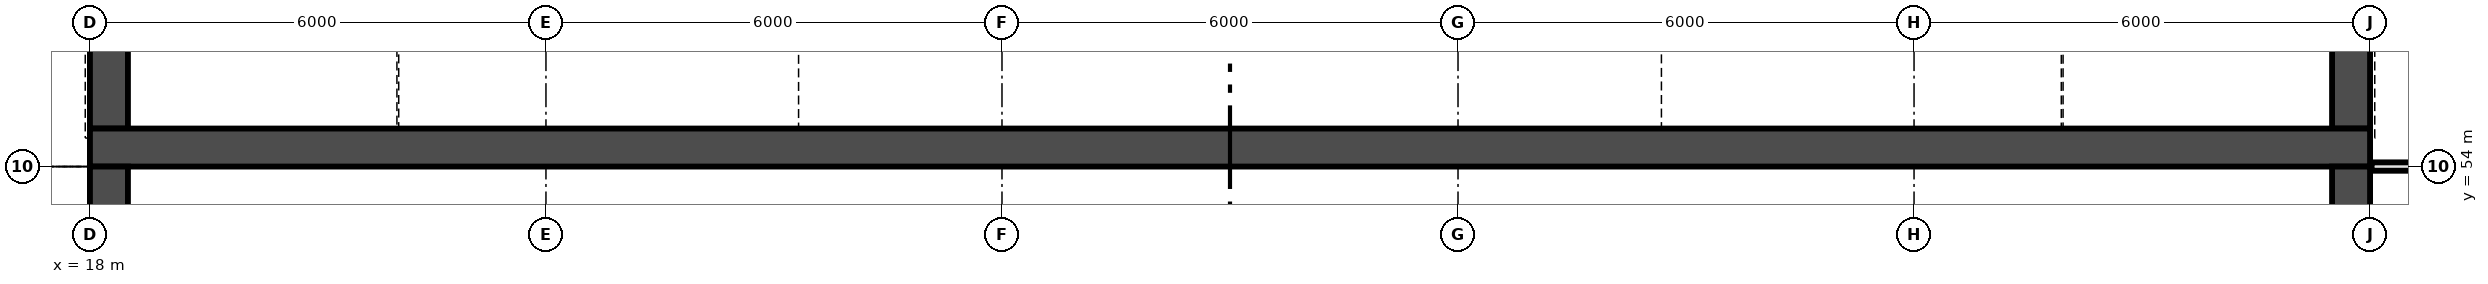
"""IFC4 building model, lengths in metres.
Left out: names, types, materials, properties, quantities, classifications, styles, units other than length and angle.
Written with IfcOpenShell. Run it as: python <this file> out.ifc"""

import sys

from ifc_helpers import new_model, si_unit, direction, frame, frame_2d, origin, place, context, subcontext, project, spatial, rectangle, extrude, element, save


model = new_model("IFC4")
c1 = context("Model", 3, precision=1e-05, world=origin(), true_north=direction((0.0, 1.0)))
c2 = subcontext(c1, "Body", "Model", "MODEL_VIEW")
j1 = project(units=[si_unit("LENGTHUNIT", "METRE"), si_unit("PLANEANGLEUNIT", "RADIAN")], contexts=[c1])
p1 = place(None, origin())
s1 = spatial("IfcSite", under=j1, at=p1, CompositionType="ELEMENT")
p2 = place(p1, origin())
s2 = spatial("IfcBuilding", under=s1, at=p2, CompositionType="ELEMENT")
p3 = place(p2, frame((0.0, 0.0, 16.5)))
s3 = spatial("IfcBuildingStorey", under=s2, at=p3, CompositionType="ELEMENT", Elevation=16.5)
p4 = place(p3, frame((18.25, 54.5, 0.0), z_axis=(0.0, 0.0, 1.0), x_axis=(0.0, 1.0, 0.0)))
e1 = element("IfcWall", 1, at=p4, inside=s3, PredefinedType="SHEAR", context=c2, shape_type="SweptSolid", body=[
    extrude(rectangle(XDim=35.5, YDim=0.5, at=frame_2d((17.75, 0.0))), origin(), (0.0, 0.0, 1.0), 3.9),
])
p5 = place(p4, frame((29.35, 0.0, 0.0)))
e2 = element("IfcOpeningElement", 2, at=p5, cuts=e1, PredefinedType="OPENING", context=c2, shape_type="SweptSolid", body=[
    extrude(rectangle(XDim=1.3, YDim=2.1, at=frame_2d((0.65, 1.05))), frame((0.0, 0.26, 0.0), z_axis=(0.0, -1.0, 0.0), x_axis=(1.0, 0.0, 0.0)), (0.0, 0.0, 1.0), 0.52),
])
p6 = place(p4, frame((2.6, 0.0, 0.0)))
e3 = element("IfcOpeningElement", 3, at=p6, cuts=e1, PredefinedType="OPENING", context=c2, shape_type="SweptSolid", body=[
    extrude(rectangle(XDim=1.0, YDim=2.1, at=frame_2d((0.5, 1.05))), frame((0.0, 0.26, 0.0), z_axis=(0.0, -1.0, 0.0), x_axis=(1.0, 0.0, 0.0)), (0.0, 0.0, 1.0), 0.52),
])
p7 = place(p3, frame((18.25, 30.0, 0.0), z_axis=(0.0, 0.0, 1.0), x_axis=(0.0, 1.0, 0.0)))
e4 = element("IfcWall", 4, at=p7, inside=s3, PredefinedType="SHEAR", context=c2, shape_type="SweptSolid", body=[
    extrude(rectangle(XDim=24.0, YDim=0.5, at=frame_2d((12.0, 0.0))), origin(), (0.0, 0.0, 1.0), 6.5),
])
p8 = place(p3, frame((47.75, 54.5, 0.0), z_axis=(0.0, 0.0, 1.0), x_axis=(0.0, 1.0, 0.0)))
e5 = element("IfcWall", 5, at=p8, inside=s3, PredefinedType="SHEAR", context=c2, shape_type="SweptSolid", body=[
    extrude(rectangle(XDim=35.5, YDim=0.5, at=frame_2d((17.75, 0.0))), origin(), (0.0, 0.0, 1.0), 3.9),
])
p9 = place(p8, frame((29.35, 0.0, 0.0)))
e6 = element("IfcOpeningElement", 6, at=p9, cuts=e5, PredefinedType="OPENING", context=c2, shape_type="SweptSolid", body=[
    extrude(rectangle(XDim=1.3, YDim=2.1, at=frame_2d((0.65, 1.05))), frame((0.0, 0.26, 0.0), z_axis=(0.0, -1.0, 0.0), x_axis=(1.0, 0.0, 0.0)), (0.0, 0.0, 1.0), 0.52),
])
p10 = place(p8, frame((2.6, 0.0, 0.0)))
e7 = element("IfcOpeningElement", 7, at=p10, cuts=e5, PredefinedType="OPENING", context=c2, shape_type="SweptSolid", body=[
    extrude(rectangle(XDim=1.0, YDim=2.1, at=frame_2d((0.5, 1.05))), frame((0.0, 0.26, 0.0), z_axis=(0.0, -1.0, 0.0), x_axis=(1.0, 0.0, 0.0)), (0.0, 0.0, 1.0), 0.52),
])
p11 = place(p3, frame((47.75, 30.0, 0.0), z_axis=(0.0, 0.0, 1.0), x_axis=(0.0, 1.0, 0.0)))
e8 = element("IfcWall", 8, at=p11, inside=s3, PredefinedType="SHEAR", context=c2, shape_type="SweptSolid", body=[
    extrude(rectangle(XDim=24.0, YDim=0.5, at=frame_2d((12.0, 0.0))), origin(), (0.0, 0.0, 1.0), 6.5),
])
p12 = place(p3, frame((18.0, 54.25, 0.0), z_axis=(0.0, 0.0, 1.0), x_axis=(1.0, 0.0, 0.0)))
e9 = element("IfcWall", 9, at=p12, inside=s3, PredefinedType="SHEAR", context=c2, shape_type="SweptSolid", body=[
    extrude(rectangle(XDim=30.0, YDim=0.5, at=frame_2d((15.0, 0.0))), origin(), (0.0, 0.0, 1.0), 6.5),
])
p13 = place(p3, frame((48.02, 54.0, 0.0), z_axis=(0.0, 0.0, 1.0), x_axis=(1.0, 0.0, 0.0)))
e10 = element("IfcWall", 10, at=p13, inside=s3, PredefinedType="PARTITIONING", context=c2, shape_type="SweptSolid", body=[
    extrude(rectangle(XDim=2.96, YDim=0.11, at=frame_2d((1.48, 0.0))), origin(), (0.0, 0.0, 1.0), 3.9),
])
save(model, sys.argv[1])
